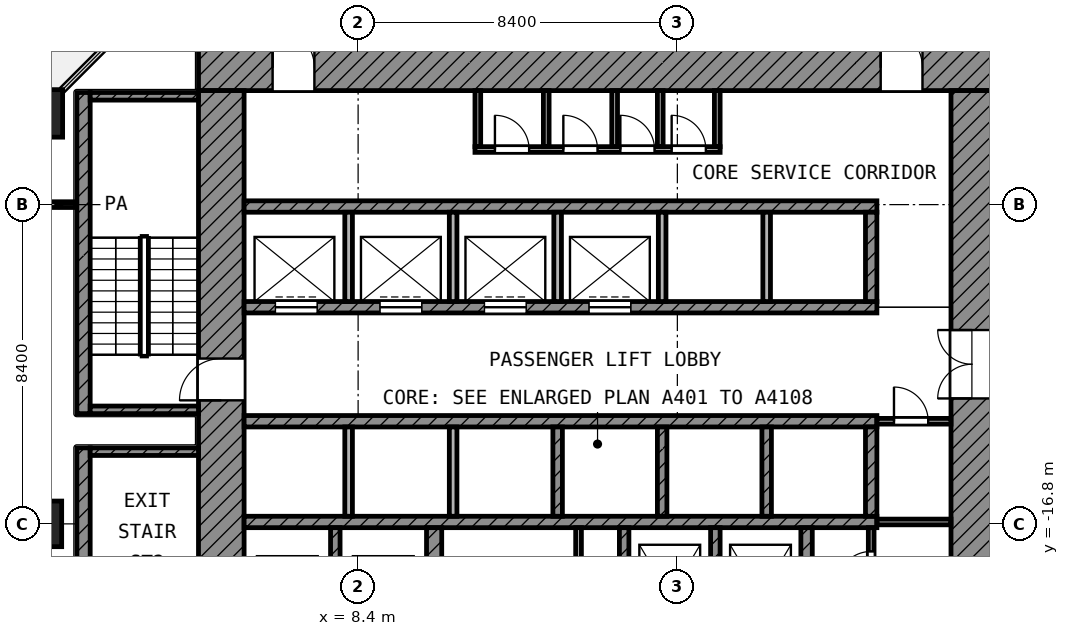
"""IFC4 building model, lengths in metres.
Left out: names, types, materials, properties, quantities, classifications, styles, units other than length and angle.
Written with IfcOpenShell. Run it as: python <this file> out.ifc"""

import sys

from ifc_helpers import new_model, si_unit, direction, frame, frame_2d, origin, origin_2d, place, context, subcontext, project, spatial, rectangle, extrude, element, fill, save


model = new_model("IFC4")
c1 = context("Model", 3, precision=1e-05, world=origin(), true_north=direction((0.0, 1.0)))
c2 = subcontext(c1, "Body", "Model", "MODEL_VIEW")
j1 = project(units=[si_unit("LENGTHUNIT", "METRE"), si_unit("PLANEANGLEUNIT", "RADIAN")], contexts=[c1])
p1 = place(None, origin())
s1 = spatial("IfcSite", under=j1, at=p1, CompositionType="ELEMENT")
p2 = place(p1, origin())
s2 = spatial("IfcBuilding", under=s1, at=p2, CompositionType="ELEMENT")
p3 = place(p2, frame((0.0, 0.0, 72.8)))
s3 = spatial("IfcBuildingStorey", under=s2, at=p3, CompositionType="ELEMENT", Elevation=72.8)
p4 = place(p3, frame((0.0, -6.0, 0.0), z_axis=(0.0, 0.0, 1.0), x_axis=(1.0, 0.0, 0.0)))
e1 = element("IfcColumn", 1, at=p4, inside=s3, PredefinedType="COLUMN", context=c2, shape_type="SweptSolid", body=[
    extrude(rectangle(XDim=1.25, YDim=1.25, at=origin_2d()), origin(), (0.0, 0.0, 1.0), 4.2),
])
p5 = place(p3, frame((0.0, -16.8, 0.0), z_axis=(0.0, 0.0, 1.0), x_axis=(1.0, 0.0, 0.0)))
e2 = element("IfcColumn", 2, at=p5, inside=s3, PredefinedType="COLUMN", context=c2, shape_type="SweptSolid", body=[
    extrude(rectangle(XDim=1.2, YDim=1.2, at=origin_2d()), origin(), (0.0, 0.0, 1.0), 4.2),
])
p6 = place(p3, frame((4.2, -4.8, 0.0), z_axis=(0.0, 0.0, 1.0), x_axis=(1.0, 0.0, 0.0)))
e3 = element("IfcWall", 3, at=p6, inside=s3, PredefinedType="SHEAR", context=c2, shape_type="SweptSolid", body=[
    extrude(rectangle(XDim=20.9, YDim=1.2, at=frame_2d((10.45, 0.0))), origin(), (0.0, 0.0, 1.0), 3.9),
])
p7 = place(p6, frame((1.95, 0.0, 0.0)))
e4 = element("IfcOpeningElement", 4, at=p7, cuts=e3, PredefinedType="OPENING", context=c2, shape_type="SweptSolid", body=[
    extrude(rectangle(XDim=1.1, YDim=2.1, at=frame_2d((0.55, 1.05))), frame((0.0, 0.61, 0.0), z_axis=(0.0, -1.0, 0.0), x_axis=(1.0, 0.0, 0.0)), (0.0, 0.0, 1.0), 1.22),
])
p8 = place(p6, frame((17.95, 0.0, 0.0)))
e5 = element("IfcOpeningElement", 5, at=p8, cuts=e3, PredefinedType="OPENING", context=c2, shape_type="SweptSolid", body=[
    extrude(rectangle(XDim=1.1, YDim=2.1, at=frame_2d((0.55, 1.05))), frame((0.0, 0.61, 0.0), z_axis=(0.0, -1.0, 0.0), x_axis=(1.0, 0.0, 0.0)), (0.0, 0.0, 1.0), 1.22),
])
p9 = place(p3, frame((4.8, -25.1, 0.0), z_axis=(0.0, 0.0, 1.0), x_axis=(0.0, 1.0, 0.0)))
e6 = element("IfcWall", 6, at=p9, inside=s3, PredefinedType="SHEAR", context=c2, shape_type="SweptSolid", body=[
    extrude(rectangle(XDim=19.7, YDim=1.2, at=frame_2d((9.85, 0.0))), origin(), (0.0, 0.0, 1.0), 3.9),
])
p10 = place(p9, frame((11.55, 0.0, 0.0)))
e7 = element("IfcOpeningElement", 7, at=p10, cuts=e6, PredefinedType="OPENING", context=c2, shape_type="SweptSolid", body=[
    extrude(rectangle(XDim=1.1, YDim=2.1, at=frame_2d((0.55, 1.05))), frame((0.0, 0.61, 0.0), z_axis=(0.0, -1.0, 0.0), x_axis=(1.0, 0.0, 0.0)), (0.0, 0.0, 1.0), 1.22),
])
p11 = place(p9, frame((2.25, 0.0, 0.0)))
e8 = element("IfcOpeningElement", 8, at=p11, cuts=e6, PredefinedType="OPENING", context=c2, shape_type="SweptSolid", body=[
    extrude(rectangle(XDim=1.1, YDim=2.1, at=frame_2d((0.55, 1.05))), frame((0.0, 0.61, 0.0), z_axis=(0.0, -1.0, 0.0), x_axis=(1.0, 0.0, 0.0)), (0.0, 0.0, 1.0), 1.22),
])
p12 = place(p3, frame((24.55, -24.0, 0.0), z_axis=(0.0, 0.0, 1.0), x_axis=(0.0, 1.0, 0.0)))
e9 = element("IfcWall", 9, at=p12, inside=s3, PredefinedType="SHEAR", context=c2, shape_type="SweptSolid", body=[
    extrude(rectangle(XDim=18.6, YDim=1.1, at=frame_2d((9.3, 0.0))), origin(), (0.0, 0.0, 1.0), 3.9),
])
p13 = place(p12, frame((10.5, 0.0, 0.0)))
e10 = element("IfcOpeningElement", 10, at=p13, cuts=e9, PredefinedType="OPENING", context=c2, shape_type="SweptSolid", body=[
    extrude(rectangle(XDim=1.8, YDim=2.1, at=frame_2d((0.9, 1.05))), frame((0.0, 0.56, 0.0), z_axis=(0.0, -1.0, 0.0), x_axis=(1.0, 0.0, 0.0)), (0.0, 0.0, 1.0), 1.12),
])
p14 = place(p3, frame((5.4, -8.45, 0.0), z_axis=(0.0, 0.0, 1.0), x_axis=(1.0, 0.0, 0.0)))
e11 = element("IfcWall", 11, at=p14, inside=s3, PredefinedType="SHEAR", context=c2, shape_type="SweptSolid", body=[
    extrude(rectangle(XDim=16.65, YDim=0.3, at=frame_2d((8.325, 0.0))), origin(), (0.0, 0.0, 1.0), 3.9),
])
p15 = place(p3, frame((5.4, -11.1, 0.0), z_axis=(0.0, 0.0, 1.0), x_axis=(1.0, 0.0, 0.0)))
e12 = element("IfcWall", 12, at=p15, inside=s3, PredefinedType="SHEAR", context=c2, shape_type="SweptSolid", body=[
    extrude(rectangle(XDim=16.65, YDim=0.3, at=frame_2d((8.325, 0.0))), origin(), (0.0, 0.0, 1.0), 3.9),
])
p16 = place(p15, frame((0.825, 0.0, 0.0)))
e13 = element("IfcOpeningElement", 13, at=p16, cuts=e12, PredefinedType="OPENING", context=c2, shape_type="SweptSolid", body=[
    extrude(rectangle(XDim=1.1, YDim=2.1, at=frame_2d((0.55, 1.05))), frame((0.0, 0.16, 0.0), z_axis=(0.0, -1.0, 0.0), x_axis=(1.0, 0.0, 0.0)), (0.0, 0.0, 1.0), 0.32),
])
p17 = place(p15, frame((3.575, 0.0, 0.0)))
e14 = element("IfcOpeningElement", 14, at=p17, cuts=e12, PredefinedType="OPENING", context=c2, shape_type="SweptSolid", body=[
    extrude(rectangle(XDim=1.1, YDim=2.1, at=frame_2d((0.55, 1.05))), frame((0.0, 0.16, 0.0), z_axis=(0.0, -1.0, 0.0), x_axis=(1.0, 0.0, 0.0)), (0.0, 0.0, 1.0), 0.32),
])
p18 = place(p15, frame((6.325, 0.0, 0.0)))
e15 = element("IfcOpeningElement", 15, at=p18, cuts=e12, PredefinedType="OPENING", context=c2, shape_type="SweptSolid", body=[
    extrude(rectangle(XDim=1.1, YDim=2.1, at=frame_2d((0.55, 1.05))), frame((0.0, 0.16, 0.0), z_axis=(0.0, -1.0, 0.0), x_axis=(1.0, 0.0, 0.0)), (0.0, 0.0, 1.0), 0.32),
])
p19 = place(p15, frame((9.075, 0.0, 0.0)))
e16 = element("IfcOpeningElement", 16, at=p19, cuts=e12, PredefinedType="OPENING", context=c2, shape_type="SweptSolid", body=[
    extrude(rectangle(XDim=1.1, YDim=2.1, at=frame_2d((0.55, 1.05))), frame((0.0, 0.16, 0.0), z_axis=(0.0, -1.0, 0.0), x_axis=(1.0, 0.0, 0.0)), (0.0, 0.0, 1.0), 0.32),
])
for number, where, z_axis, x_axis in (
    (17, (5.4, -14.1, 0.0), (0.0, 0.0, 1.0), (1.0, 0.0, 0.0)),
    (18, (5.4, -16.75, 0.0), (0.0, 0.0, 1.0), (1.0, 0.0, 0.0)),
):
    element("IfcWall", number, at=place(p3, frame(where, z_axis=z_axis, x_axis=x_axis)), inside=s3, PredefinedType="SHEAR", context=c2, shape_type="SweptSolid", body=[
        extrude(rectangle(XDim=16.65, YDim=0.3, at=frame_2d((8.325, 0.0))), origin(), (0.0, 0.0, 1.0), 3.9),
    ])
p20 = place(p3, frame((10.4, -20.05, 0.0), z_axis=(0.0, 0.0, 1.0), x_axis=(0.0, 1.0, 0.0)))
e19 = element("IfcWall", 19, at=p20, inside=s3, PredefinedType="SHEAR", context=c2, shape_type="SweptSolid", body=[
    extrude(rectangle(XDim=3.15, YDim=0.4, at=frame_2d((1.575, 0.0))), origin(), (0.0, 0.0, 1.0), 3.9),
])
p21 = place(p3, frame((20.2, -20.35, 0.0), z_axis=(0.0, 0.0, 1.0), x_axis=(0.0, 1.0, 0.0)))
e20 = element("IfcWall", 20, at=p21, inside=s3, PredefinedType="SHEAR", context=c2, shape_type="SweptSolid", body=[
    extrude(rectangle(XDim=3.45, YDim=0.3, at=frame_2d((1.725, 0.0))), origin(), (0.0, 0.0, 1.0), 3.9),
])
p22 = place(p3, frame((21.9, -10.95, 0.0), z_axis=(0.0, 0.0, 1.0), x_axis=(0.0, 1.0, 0.0)))
e21 = element("IfcWall", 21, at=p22, inside=s3, PredefinedType="SHEAR", context=c2, shape_type="SweptSolid", body=[
    extrude(rectangle(XDim=2.35, YDim=0.3, at=frame_2d((1.175, 0.0))), origin(), (0.0, 0.0, 1.0), 3.9),
])
p23 = place(p3, frame((21.9, -16.6, 0.0), z_axis=(0.0, 0.0, 1.0), x_axis=(0.0, 1.0, 0.0)))
e22 = element("IfcWall", 22, at=p23, inside=s3, PredefinedType="SHEAR", context=c2, shape_type="SweptSolid", body=[
    extrude(rectangle(XDim=2.35, YDim=0.3, at=frame_2d((1.175, 0.0))), origin(), (0.0, 0.0, 1.0), 3.9),
])
for number, where, z_axis, x_axis in (
    (23, (7.8, -20.05, 0.0), (0.0, 0.0, 1.0), (0.0, 1.0, 0.0)),
    (24, (15.4, -20.05, 0.0), (0.0, 0.0, 1.0), (0.0, 1.0, 0.0)),
    (25, (17.8, -20.05, 0.0), (0.0, 0.0, 1.0), (0.0, 1.0, 0.0)),
):
    element("IfcWall", number, at=place(p3, frame(where, z_axis=z_axis, x_axis=x_axis)), inside=s3, PredefinedType="SHEAR", context=c2, shape_type="SweptSolid", body=[
        extrude(rectangle(XDim=3.15, YDim=0.25, at=frame_2d((1.575, 0.0))), origin(), (0.0, 0.0, 1.0), 3.9),
    ])
for number, where, z_axis, x_axis in (
    (26, (8.15, -10.95, 0.0), (0.0, 0.0, 1.0), (0.0, 1.0, 0.0)),
    (27, (10.9, -10.95, 0.0), (0.0, 0.0, 1.0), (0.0, 1.0, 0.0)),
    (28, (13.65, -10.95, 0.0), (0.0, 0.0, 1.0), (0.0, 1.0, 0.0)),
    (29, (16.4, -10.95, 0.0), (0.0, 0.0, 1.0), (0.0, 1.0, 0.0)),
    (30, (19.15, -10.95, 0.0), (0.0, 0.0, 1.0), (0.0, 1.0, 0.0)),
):
    element("IfcWall", number, at=place(p3, frame(where, z_axis=z_axis, x_axis=x_axis)), inside=s3, PredefinedType="PARTITIONING", context=c2, shape_type="SweptSolid", body=[
        extrude(rectangle(XDim=2.35, YDim=0.2, at=frame_2d((1.175, 0.0))), origin(), (0.0, 0.0, 1.0), 3.9),
    ])
for number, where, z_axis, x_axis in (
    (31, (8.15, -16.6, 0.0), (0.0, 0.0, 1.0), (0.0, 1.0, 0.0)),
    (32, (10.9, -16.6, 0.0), (0.0, 0.0, 1.0), (0.0, 1.0, 0.0)),
):
    element("IfcWall", number, at=place(p3, frame(where, z_axis=z_axis, x_axis=x_axis)), inside=s3, PredefinedType="PARTITIONING", context=c2, shape_type="SweptSolid", body=[
        extrude(rectangle(XDim=2.35, YDim=0.2, at=frame_2d((1.175, 0.0))), origin(), (0.0, 0.0, 1.0), 3.9),
    ])
for number, where, z_axis, x_axis in (
    (33, (13.65, -16.6, 0.0), (0.0, 0.0, 1.0), (0.0, 1.0, 0.0)),
    (34, (16.4, -16.6, 0.0), (0.0, 0.0, 1.0), (0.0, 1.0, 0.0)),
    (35, (19.15, -16.6, 0.0), (0.0, 0.0, 1.0), (0.0, 1.0, 0.0)),
):
    element("IfcWall", number, at=place(p3, frame(where, z_axis=z_axis, x_axis=x_axis)), inside=s3, PredefinedType="SHEAR", context=c2, shape_type="SweptSolid", body=[
        extrude(rectangle(XDim=2.35, YDim=0.25, at=frame_2d((1.175, 0.0))), origin(), (0.0, 0.0, 1.0), 3.9),
    ])
p24 = place(p3, frame((21.9, -19.05, 0.0), z_axis=(0.0, 0.0, 1.0), x_axis=(0.0, 1.0, 0.0)))
e36 = element("IfcWall", 36, at=p24, inside=s3, PredefinedType="PARTITIONING", context=c2, shape_type="SweptSolid", body=[
    extrude(rectangle(XDim=2.15, YDim=0.15, at=frame_2d((1.075, 0.0))), origin(), (0.0, 0.0, 1.0), 3.9),
])
p25 = place(p24, frame((0.625, 0.0, 0.0)))
e37 = element("IfcOpeningElement", 37, at=p25, cuts=e36, PredefinedType="OPENING", context=c2, shape_type="SweptSolid", body=[
    extrude(rectangle(XDim=0.9, YDim=2.1, at=frame_2d((0.45, 1.05))), frame((0.0, 0.085, 0.0), z_axis=(0.0, -1.0, 0.0), x_axis=(1.0, 0.0, 0.0)), (0.0, 0.0, 1.0), 0.17),
])
p26 = place(p3, frame((22.05, -16.75, 0.0), z_axis=(0.0, 0.0, 1.0), x_axis=(1.0, 0.0, 0.0)))
e38 = element("IfcWall", 38, at=p26, inside=s3, PredefinedType="PARTITIONING", context=c2, shape_type="SweptSolid", body=[
    extrude(rectangle(XDim=1.95, YDim=0.15, at=frame_2d((0.975, 0.0))), origin(), (0.0, 0.0, 1.0), 3.9),
])
p27 = place(p3, frame((22.05, -14.1, 0.0), z_axis=(0.0, 0.0, 1.0), x_axis=(1.0, 0.0, 0.0)))
e39 = element("IfcWall", 39, at=p27, inside=s3, PredefinedType="PARTITIONING", context=c2, shape_type="SweptSolid", body=[
    extrude(rectangle(XDim=1.95, YDim=0.15, at=frame_2d((0.975, 0.0))), origin(), (0.0, 0.0, 1.0), 3.9),
])
p28 = place(p27, frame((0.45, 0.0, 0.0)))
e40 = element("IfcOpeningElement", 40, at=p28, cuts=e39, PredefinedType="OPENING", context=c2, shape_type="SweptSolid", body=[
    extrude(rectangle(XDim=0.9, YDim=2.1, at=frame_2d((0.45, 1.05))), frame((0.0, 0.085, 0.0), z_axis=(0.0, -1.0, 0.0), x_axis=(1.0, 0.0, 0.0)), (0.0, 0.0, 1.0), 0.17),
])
p29 = place(p3, frame((11.475, -6.95, 0.0), z_axis=(0.0, 0.0, 1.0), x_axis=(1.0, 0.0, 0.0)))
e41 = element("IfcWall", 41, at=p29, inside=s3, PredefinedType="PARTITIONING", context=c2, shape_type="SweptSolid", body=[
    extrude(rectangle(XDim=6.45, YDim=0.15, at=frame_2d((3.225, 0.0))), origin(), (0.0, 0.0, 1.0), 3.9),
])
p30 = place(p29, frame((0.525, 0.0, 0.0)))
e42 = element("IfcOpeningElement", 42, at=p30, cuts=e41, PredefinedType="OPENING", context=c2, shape_type="SweptSolid", body=[
    extrude(rectangle(XDim=0.9, YDim=2.1, at=frame_2d((0.45, 1.05))), frame((0.0, 0.085, 0.0), z_axis=(0.0, -1.0, 0.0), x_axis=(1.0, 0.0, 0.0)), (0.0, 0.0, 1.0), 0.17),
])
p31 = place(p29, frame((2.325, 0.0, 0.0)))
e43 = element("IfcOpeningElement", 43, at=p31, cuts=e41, PredefinedType="OPENING", context=c2, shape_type="SweptSolid", body=[
    extrude(rectangle(XDim=0.9, YDim=2.1, at=frame_2d((0.45, 1.05))), frame((0.0, 0.085, 0.0), z_axis=(0.0, -1.0, 0.0), x_axis=(1.0, 0.0, 0.0)), (0.0, 0.0, 1.0), 0.17),
])
p32 = place(p29, frame((3.825, 0.0, 0.0)))
e44 = element("IfcOpeningElement", 44, at=p32, cuts=e41, PredefinedType="OPENING", context=c2, shape_type="SweptSolid", body=[
    extrude(rectangle(XDim=0.9, YDim=2.1, at=frame_2d((0.45, 1.05))), frame((0.0, 0.085, 0.0), z_axis=(0.0, -1.0, 0.0), x_axis=(1.0, 0.0, 0.0)), (0.0, 0.0, 1.0), 0.17),
])
p33 = place(p29, frame((5.175, 0.0, 0.0)))
e45 = element("IfcOpeningElement", 45, at=p33, cuts=e41, PredefinedType="OPENING", context=c2, shape_type="SweptSolid", body=[
    extrude(rectangle(XDim=0.9, YDim=2.1, at=frame_2d((0.45, 1.05))), frame((0.0, 0.085, 0.0), z_axis=(0.0, -1.0, 0.0), x_axis=(1.0, 0.0, 0.0)), (0.0, 0.0, 1.0), 0.17),
])
for number, where, z_axis, x_axis in (
    (46, (11.55, -6.875, 0.0), (0.0, 0.0, 1.0), (0.0, 1.0, 0.0)),
    (47, (13.35, -6.875, 0.0), (0.0, 0.0, 1.0), (0.0, 1.0, 0.0)),
):
    element("IfcWall", number, at=place(p3, frame(where, z_axis=z_axis, x_axis=x_axis)), inside=s3, PredefinedType="PARTITIONING", context=c2, shape_type="SweptSolid", body=[
        extrude(rectangle(XDim=1.475, YDim=0.15, at=frame_2d((0.738, 0.0))), origin(), (0.0, 0.0, 1.0), 3.9),
    ])
p34 = place(p3, frame((14.2, -20.05, 0.0), z_axis=(0.0, 0.0, 1.0), x_axis=(0.0, 1.0, 0.0)))
e48 = element("IfcWall", 48, at=p34, inside=s3, PredefinedType="PARTITIONING", context=c2, shape_type="SweptSolid", body=[
    extrude(rectangle(XDim=3.15, YDim=0.15, at=frame_2d((1.575, 0.0))), origin(), (0.0, 0.0, 1.0), 3.9),
])
for number, where, z_axis, x_axis in (
    (49, (15.15, -6.875, 0.0), (0.0, 0.0, 1.0), (0.0, 1.0, 0.0)),
    (50, (16.35, -6.875, 0.0), (0.0, 0.0, 1.0), (0.0, 1.0, 0.0)),
    (51, (17.85, -6.875, 0.0), (0.0, 0.0, 1.0), (0.0, 1.0, 0.0)),
):
    element("IfcWall", number, at=place(p3, frame(where, z_axis=z_axis, x_axis=x_axis)), inside=s3, PredefinedType="PARTITIONING", context=c2, shape_type="SweptSolid", body=[
        extrude(rectangle(XDim=1.475, YDim=0.15, at=frame_2d((0.738, 0.0))), origin(), (0.0, 0.0, 1.0), 3.9),
    ])
p35 = place(p3, frame((1.175, -13.9, 0.0), z_axis=(0.0, 0.0, 1.0), x_axis=(0.0, 1.0, 0.0)))
e52 = element("IfcWall", 52, at=p35, inside=s3, PredefinedType="SHEAR", context=c2, shape_type="SweptSolid", body=[
    extrude(rectangle(XDim=8.45, YDim=0.35, at=frame_2d((4.225, 0.0))), origin(), (0.0, 0.0, 1.0), 3.9),
])
for number, where, z_axis, x_axis in (
    (53, (1.35, -5.55, 0.0), (0.0, 0.0, 1.0), (1.0, 0.0, 0.0)),
    (54, (1.35, -13.8, 0.0), (0.0, 0.0, 1.0), (1.0, 0.0, 0.0)),
):
    element("IfcWall", number, at=place(p3, frame(where, z_axis=z_axis, x_axis=x_axis)), inside=s3, PredefinedType="SHEAR", context=c2, shape_type="SweptSolid", body=[
        extrude(rectangle(XDim=2.85, YDim=0.2, at=frame_2d((1.425, 0.0))), origin(), (0.0, 0.0, 1.0), 3.9),
    ])
p36 = place(p3, frame((1.175, -23.25, 0.0), z_axis=(0.0, 0.0, 1.0), x_axis=(0.0, 1.0, 0.0)))
e55 = element("IfcWall", 55, at=p36, inside=s3, PredefinedType="SHEAR", context=c2, shape_type="SweptSolid", body=[
    extrude(rectangle(XDim=8.45, YDim=0.35, at=frame_2d((4.225, 0.0))), origin(), (0.0, 0.0, 1.0), 3.9),
])
p37 = place(p3, frame((1.35, -14.9, 0.0), z_axis=(0.0, 0.0, 1.0), x_axis=(1.0, 0.0, 0.0)))
e56 = element("IfcWall", 56, at=p37, inside=s3, PredefinedType="SHEAR", context=c2, shape_type="SweptSolid", body=[
    extrude(rectangle(XDim=2.85, YDim=0.2, at=frame_2d((1.425, 0.0))), origin(), (0.0, 0.0, 1.0), 3.9),
])
p38 = place(p3, frame((0.08, -8.4, 0.0), z_axis=(0.0, 0.0, 1.0), x_axis=(1.0, 0.0, 0.0)))
e57 = element("IfcWall", 57, at=p38, inside=s3, PredefinedType="PARTITIONING", context=c2, shape_type="SweptSolid", body=[
    extrude(rectangle(XDim=0.89, YDim=0.15, at=frame_2d((0.445, 0.0))), origin(), (0.0, 0.0, 1.0), 3.9),
])
p39 = place(p16, origin())
e58 = element("IfcDoor", 58, at=p39, inside=s3, OperationType="DOUBLE_DOOR_SLIDING", PredefinedType="DOOR", context=c2, shape_type="SweptSolid", body=[
    extrude(rectangle(XDim=1.1, YDim=2.1, at=frame_2d((0.55, 1.05))), frame((0.0, 0.025, 0.0), z_axis=(0.0, -1.0, 0.0), x_axis=(1.0, 0.0, 0.0)), (0.0, 0.0, 1.0), 0.05),
])
fill(e13, e58)
p40 = place(p17, origin())
e59 = element("IfcDoor", 59, at=p40, inside=s3, OperationType="DOUBLE_DOOR_SLIDING", PredefinedType="DOOR", context=c2, shape_type="SweptSolid", body=[
    extrude(rectangle(XDim=1.1, YDim=2.1, at=frame_2d((0.55, 1.05))), frame((0.0, 0.025, 0.0), z_axis=(0.0, -1.0, 0.0), x_axis=(1.0, 0.0, 0.0)), (0.0, 0.0, 1.0), 0.05),
])
fill(e14, e59)
p41 = place(p18, origin())
e60 = element("IfcDoor", 60, at=p41, inside=s3, OperationType="DOUBLE_DOOR_SLIDING", PredefinedType="DOOR", context=c2, shape_type="SweptSolid", body=[
    extrude(rectangle(XDim=1.1, YDim=2.1, at=frame_2d((0.55, 1.05))), frame((0.0, 0.025, 0.0), z_axis=(0.0, -1.0, 0.0), x_axis=(1.0, 0.0, 0.0)), (0.0, 0.0, 1.0), 0.05),
])
fill(e15, e60)
p42 = place(p19, origin())
e61 = element("IfcDoor", 61, at=p42, inside=s3, OperationType="DOUBLE_DOOR_SLIDING", PredefinedType="DOOR", context=c2, shape_type="SweptSolid", body=[
    extrude(rectangle(XDim=1.1, YDim=2.1, at=frame_2d((0.55, 1.05))), frame((0.0, 0.025, 0.0), z_axis=(0.0, -1.0, 0.0), x_axis=(1.0, 0.0, 0.0)), (0.0, 0.0, 1.0), 0.05),
])
fill(e16, e61)
p43 = place(p10, origin())
e62 = element("IfcDoor", 62, at=p43, inside=s3, OperationType="SINGLE_SWING_LEFT", PredefinedType="DOOR", context=c2, shape_type="SweptSolid", body=[
    extrude(rectangle(XDim=1.1, YDim=2.1, at=frame_2d((0.55, 1.05))), frame((0.0, 0.025, 0.0), z_axis=(0.0, -1.0, 0.0), x_axis=(1.0, 0.0, 0.0)), (0.0, 0.0, 1.0), 0.05),
])
fill(e7, e62)
p44 = place(p7, origin())
e63 = element("IfcDoor", 63, at=p44, inside=s3, OperationType="SINGLE_SWING_LEFT", PredefinedType="DOOR", context=c2, shape_type="SweptSolid", body=[
    extrude(rectangle(XDim=1.1, YDim=2.1, at=frame_2d((0.55, 1.05))), frame((0.0, 0.025, 0.0), z_axis=(0.0, -1.0, 0.0), x_axis=(1.0, 0.0, 0.0)), (0.0, 0.0, 1.0), 0.05),
])
fill(e4, e63)
p45 = place(p8, origin())
e64 = element("IfcDoor", 64, at=p45, inside=s3, OperationType="SINGLE_SWING_LEFT", PredefinedType="DOOR", context=c2, shape_type="SweptSolid", body=[
    extrude(rectangle(XDim=1.1, YDim=2.1, at=frame_2d((0.55, 1.05))), frame((0.0, 0.025, 0.0), z_axis=(0.0, -1.0, 0.0), x_axis=(1.0, 0.0, 0.0)), (0.0, 0.0, 1.0), 0.05),
])
fill(e5, e64)
p46 = place(p13, origin())
e65 = element("IfcDoor", 65, at=p46, inside=s3, OperationType="DOUBLE_DOOR_SINGLE_SWING", PredefinedType="DOOR", context=c2, shape_type="SweptSolid", body=[
    extrude(rectangle(XDim=1.8, YDim=2.1, at=frame_2d((0.9, 1.05))), frame((0.0, 0.025, 0.0), z_axis=(0.0, -1.0, 0.0), x_axis=(1.0, 0.0, 0.0)), (0.0, 0.0, 1.0), 0.05),
])
fill(e10, e65)
p47 = place(p30, origin())
e66 = element("IfcDoor", 66, at=p47, inside=s3, OperationType="SINGLE_SWING_LEFT", PredefinedType="DOOR", context=c2, shape_type="SweptSolid", body=[
    extrude(rectangle(XDim=0.9, YDim=2.1, at=frame_2d((0.45, 1.05))), frame((0.0, 0.025, 0.0), z_axis=(0.0, -1.0, 0.0), x_axis=(1.0, 0.0, 0.0)), (0.0, 0.0, 1.0), 0.05),
])
fill(e42, e66)
p48 = place(p31, origin())
e67 = element("IfcDoor", 67, at=p48, inside=s3, OperationType="SINGLE_SWING_LEFT", PredefinedType="DOOR", context=c2, shape_type="SweptSolid", body=[
    extrude(rectangle(XDim=0.9, YDim=2.1, at=frame_2d((0.45, 1.05))), frame((0.0, 0.025, 0.0), z_axis=(0.0, -1.0, 0.0), x_axis=(1.0, 0.0, 0.0)), (0.0, 0.0, 1.0), 0.05),
])
fill(e43, e67)
p49 = place(p32, origin())
e68 = element("IfcDoor", 68, at=p49, inside=s3, OperationType="SINGLE_SWING_LEFT", PredefinedType="DOOR", context=c2, shape_type="SweptSolid", body=[
    extrude(rectangle(XDim=0.9, YDim=2.1, at=frame_2d((0.45, 1.05))), frame((0.0, 0.025, 0.0), z_axis=(0.0, -1.0, 0.0), x_axis=(1.0, 0.0, 0.0)), (0.0, 0.0, 1.0), 0.05),
])
fill(e44, e68)
p50 = place(p33, origin())
e69 = element("IfcDoor", 69, at=p50, inside=s3, OperationType="SINGLE_SWING_LEFT", PredefinedType="DOOR", context=c2, shape_type="SweptSolid", body=[
    extrude(rectangle(XDim=0.9, YDim=2.1, at=frame_2d((0.45, 1.05))), frame((0.0, 0.025, 0.0), z_axis=(0.0, -1.0, 0.0), x_axis=(1.0, 0.0, 0.0)), (0.0, 0.0, 1.0), 0.05),
])
fill(e45, e69)
p51 = place(p28, origin())
e70 = element("IfcDoor", 70, at=p51, inside=s3, OperationType="SINGLE_SWING_LEFT", PredefinedType="DOOR", context=c2, shape_type="SweptSolid", body=[
    extrude(rectangle(XDim=0.9, YDim=2.1, at=frame_2d((0.45, 1.05))), frame((0.0, 0.025, 0.0), z_axis=(0.0, -1.0, 0.0), x_axis=(1.0, 0.0, 0.0)), (0.0, 0.0, 1.0), 0.05),
])
fill(e40, e70)
p52 = place(p25, origin())
e71 = element("IfcDoor", 71, at=p52, inside=s3, OperationType="SINGLE_SWING_LEFT", PredefinedType="DOOR", context=c2, shape_type="SweptSolid", body=[
    extrude(rectangle(XDim=0.9, YDim=2.1, at=frame_2d((0.45, 1.05))), frame((0.0, 0.025, 0.0), z_axis=(0.0, -1.0, 0.0), x_axis=(1.0, 0.0, 0.0)), (0.0, 0.0, 1.0), 0.05),
])
fill(e37, e71)
save(model, sys.argv[1])
